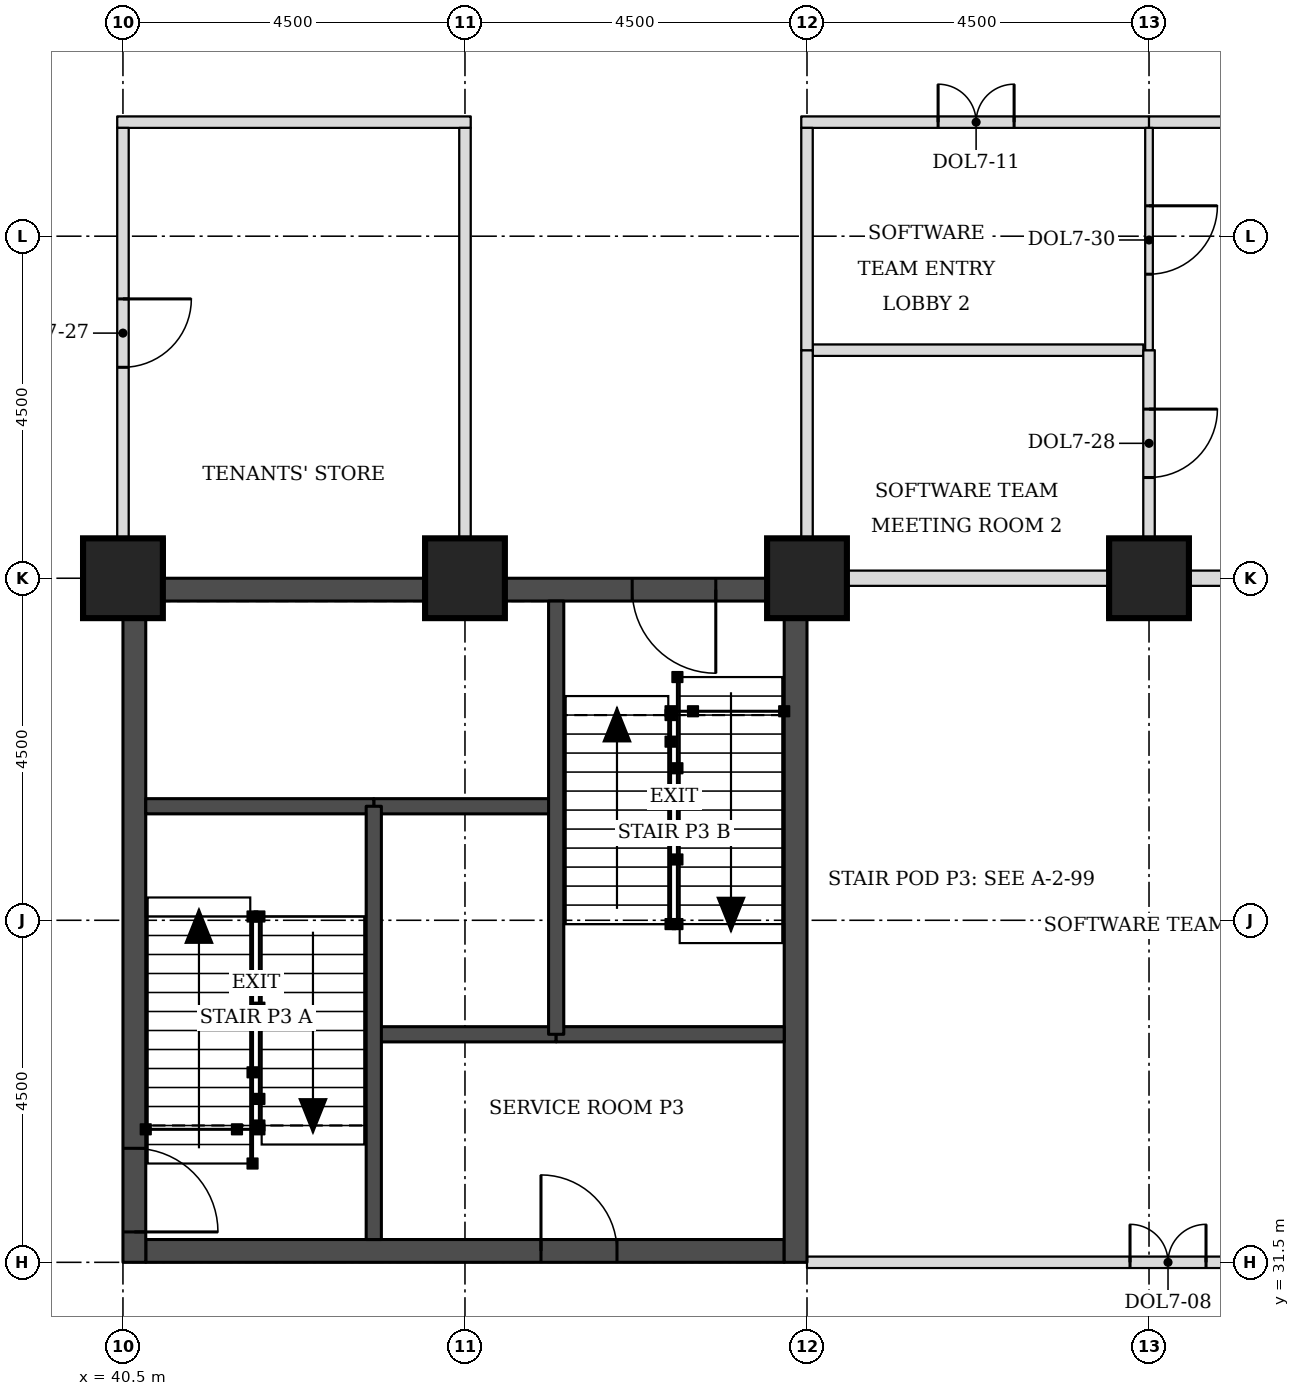
"""IFC4 building model, lengths in metres.
Left out: names, types, materials, properties, quantities, classifications, styles, units other than length and angle.
Written with IfcOpenShell. Run it as: python <this file> out.ifc"""

import sys

from ifc_helpers import new_model, si_unit, direction, frame, frame_2d, origin, origin_2d, place, context, subcontext, project, spatial, rectangle, extrude, element, fill, save


model = new_model("IFC4")
c1 = context("Model", 3, precision=1e-05, world=origin(), true_north=direction((0.0, 1.0)))
c2 = subcontext(c1, "Body", "Model", "MODEL_VIEW")
j1 = project(units=[si_unit("LENGTHUNIT", "METRE"), si_unit("PLANEANGLEUNIT", "RADIAN")], contexts=[c1])
p1 = place(None, origin())
s1 = spatial("IfcSite", under=j1, at=p1, CompositionType="ELEMENT")
p2 = place(p1, origin())
s2 = spatial("IfcBuilding", under=s1, at=p2, CompositionType="ELEMENT")
p3 = place(p2, frame((0.0, 0.0, 130.7)))
s3 = spatial("IfcBuildingStorey", under=s2, at=p3, CompositionType="ELEMENT", Elevation=130.7)
for number, where, z_axis, x_axis in (
    (1, (40.5, 40.5, 0.0), (0.0, 0.0, 1.0), (1.0, 0.0, 0.0)),
    (2, (45.0, 40.5, 0.0), (0.0, 0.0, 1.0), (1.0, 0.0, 0.0)),
    (3, (49.5, 40.5, 0.0), (0.0, 0.0, 1.0), (1.0, 0.0, 0.0)),
    (4, (54.0, 40.5, 0.0), (0.0, 0.0, 1.0), (1.0, 0.0, 0.0)),
):
    element("IfcColumn", number, at=place(p3, frame(where, z_axis=z_axis, x_axis=x_axis)), inside=s3, PredefinedType="COLUMN", context=c2, shape_type="SweptSolid", body=[
        extrude(rectangle(XDim=1.05, YDim=1.05, at=origin_2d()), origin(), (0.0, 0.0, 1.0), 3.7),
    ])
p4 = place(p3, frame((40.8, 31.65, 0.0), z_axis=(0.0, 0.0, 1.0), x_axis=(1.0, 0.0, 0.0)))
e5 = element("IfcWall", 5, at=p4, inside=s3, PredefinedType="SHEAR", context=c2, shape_type="SweptSolid", body=[
    extrude(rectangle(XDim=8.4, YDim=0.3, at=frame_2d((4.2, 0.0))), origin(), (0.0, 0.0, 1.0), 3.7),
])
p5 = place(p4, frame((5.2, 0.0, 0.0)))
e6 = element("IfcOpeningElement", 6, at=p5, cuts=e5, PredefinedType="OPENING", context=c2, shape_type="SweptSolid", body=[
    extrude(rectangle(XDim=1.0, YDim=2.1, at=frame_2d((0.5, 1.05))), frame((0.0, 0.16, 0.0), z_axis=(0.0, -1.0, 0.0), x_axis=(1.0, 0.0, 0.0)), (0.0, 0.0, 1.0), 0.32),
])
p6 = place(p3, frame((40.8, 40.35, 0.0), z_axis=(0.0, 0.0, 1.0), x_axis=(1.0, 0.0, 0.0)))
e7 = element("IfcWall", 7, at=p6, inside=s3, PredefinedType="SHEAR", context=c2, shape_type="SweptSolid", body=[
    extrude(rectangle(XDim=8.4, YDim=0.3, at=frame_2d((4.2, 0.0))), origin(), (0.0, 0.0, 1.0), 3.7),
])
p7 = place(p6, frame((6.4, 0.0, 0.0)))
e8 = element("IfcOpeningElement", 8, at=p7, cuts=e7, PredefinedType="OPENING", context=c2, shape_type="SweptSolid", body=[
    extrude(rectangle(XDim=1.1, YDim=2.1, at=frame_2d((0.55, 1.05))), frame((0.0, 0.16, 0.0), z_axis=(0.0, -1.0, 0.0), x_axis=(1.0, 0.0, 0.0)), (0.0, 0.0, 1.0), 0.32),
])
p8 = place(p3, frame((40.65, 31.5, 0.0), z_axis=(0.0, 0.0, 1.0), x_axis=(0.0, 1.0, 0.0)))
e9 = element("IfcWall", 9, at=p8, inside=s3, PredefinedType="SHEAR", context=c2, shape_type="SweptSolid", body=[
    extrude(rectangle(XDim=9.0, YDim=0.3, at=frame_2d((4.5, 0.0))), origin(), (0.0, 0.0, 1.0), 3.7),
])
p9 = place(p8, frame((0.4, 0.0, 0.0)))
e10 = element("IfcOpeningElement", 10, at=p9, cuts=e9, PredefinedType="OPENING", context=c2, shape_type="SweptSolid", body=[
    extrude(rectangle(XDim=1.1, YDim=2.1, at=frame_2d((0.55, 1.05))), frame((0.0, 0.16, 0.0), z_axis=(0.0, -1.0, 0.0), x_axis=(1.0, 0.0, 0.0)), (0.0, 0.0, 1.0), 0.32),
])
p10 = place(p3, frame((49.35, 31.5, 0.0), z_axis=(0.0, 0.0, 1.0), x_axis=(0.0, 1.0, 0.0)))
e11 = element("IfcWall", 11, at=p10, inside=s3, PredefinedType="SHEAR", context=c2, shape_type="SweptSolid", body=[
    extrude(rectangle(XDim=9.0, YDim=0.3, at=frame_2d((4.5, 0.0))), origin(), (0.0, 0.0, 1.0), 3.7),
])
p11 = place(p3, frame((49.5, 31.5, 0.0), z_axis=(0.0, 0.0, 1.0), x_axis=(1.0, 0.0, 0.0)))
e12 = element("IfcWall", 12, at=p11, inside=s3, PredefinedType="PARTITIONING", context=c2, shape_type="SweptSolid", body=[
    extrude(rectangle(XDim=9.525, YDim=0.15, at=frame_2d((4.762, 0.0))), origin(), (0.0, 0.0, 1.0), 2.55),
])
p12 = place(p11, frame((4.25, 0.0, 0.0)))
e13 = element("IfcOpeningElement", 13, at=p12, cuts=e12, PredefinedType="OPENING", context=c2, shape_type="SweptSolid", body=[
    extrude(rectangle(XDim=1.0, YDim=2.1, at=frame_2d((0.5, 1.05))), frame((0.0, 0.085, 0.0), z_axis=(0.0, -1.0, 0.0), x_axis=(1.0, 0.0, 0.0)), (0.0, 0.0, 1.0), 0.17),
])
p13 = place(p3, frame((50.015, 40.5, 0.0), z_axis=(0.0, 0.0, 1.0), x_axis=(1.0, 0.0, 0.0)))
e14 = element("IfcWall", 14, at=p13, inside=s3, PredefinedType="PARTITIONING", context=c2, shape_type="SweptSolid", body=[
    extrude(rectangle(XDim=3.46, YDim=0.2, at=frame_2d((1.73, 0.0))), origin(), (0.0, 0.0, 1.0), 2.8),
])
p14 = place(p3, frame((54.495, 40.5, 0.0), z_axis=(0.0, 0.0, 1.0), x_axis=(1.0, 0.0, 0.0)))
e15 = element("IfcWall", 15, at=p14, inside=s3, PredefinedType="PARTITIONING", context=c2, shape_type="SweptSolid", body=[
    extrude(rectangle(XDim=3.48, YDim=0.2, at=frame_2d((1.74, 0.0))), origin(), (0.0, 0.0, 1.0), 2.8),
])
p15 = place(p3, frame((49.575, 43.5, 0.0), z_axis=(0.0, 0.0, 1.0), x_axis=(1.0, 0.0, 0.0)))
e16 = element("IfcWall", 16, at=p15, inside=s3, PredefinedType="PARTITIONING", context=c2, shape_type="SweptSolid", body=[
    extrude(rectangle(XDim=4.35, YDim=0.15, at=frame_2d((2.175, 0.0))), origin(), (0.0, 0.0, 1.0), 3.55),
])
p16 = place(p3, frame((40.425, 46.5, 0.0), z_axis=(0.0, 0.0, 1.0), x_axis=(1.0, 0.0, 0.0)))
e17 = element("IfcWall", 17, at=p16, inside=s3, PredefinedType="PARTITIONING", context=c2, shape_type="SweptSolid", body=[
    extrude(rectangle(XDim=4.65, YDim=0.15, at=frame_2d((2.325, 0.0))), origin(), (0.0, 0.0, 1.0), 3.55),
])
p17 = place(p3, frame((49.425, 46.5, 0.0), z_axis=(0.0, 0.0, 1.0), x_axis=(1.0, 0.0, 0.0)))
e18 = element("IfcWall", 18, at=p17, inside=s3, PredefinedType="PARTITIONING", context=c2, shape_type="SweptSolid", body=[
    extrude(rectangle(XDim=4.575, YDim=0.15, at=frame_2d((2.288, 0.0))), origin(), (0.0, 0.0, 1.0), 3.55),
])
p18 = place(p17, frame((1.8, 0.0, 0.0)))
e19 = element("IfcOpeningElement", 19, at=p18, cuts=e18, PredefinedType="OPENING", context=c2, shape_type="SweptSolid", body=[
    extrude(rectangle(XDim=1.0, YDim=2.1, at=frame_2d((0.5, 1.05))), frame((0.0, 0.085, 0.0), z_axis=(0.0, -1.0, 0.0), x_axis=(1.0, 0.0, 0.0)), (0.0, 0.0, 1.0), 0.17),
])
p19 = place(p3, frame((54.0, 46.5, 0.0), z_axis=(0.0, 0.0, 1.0), x_axis=(1.0, 0.0, 0.0)))
e20 = element("IfcWall", 20, at=p19, inside=s3, PredefinedType="PARTITIONING", context=c2, shape_type="SweptSolid", body=[
    extrude(rectangle(XDim=6.0, YDim=0.15, at=frame_2d((3.0, 0.0))), origin(), (0.0, 0.0, 1.0), 3.55),
])
p20 = place(p3, frame((40.5, 41.025, 0.0), z_axis=(0.0, 0.0, 1.0), x_axis=(0.0, 1.0, 0.0)))
e21 = element("IfcWall", 21, at=p20, inside=s3, PredefinedType="PARTITIONING", context=c2, shape_type="SweptSolid", body=[
    extrude(rectangle(XDim=5.4, YDim=0.15, at=frame_2d((2.7, 0.0))), origin(), (0.0, 0.0, 1.0), 3.55),
])
p21 = place(p20, frame((2.25, 0.0, 0.0)))
e22 = element("IfcOpeningElement", 22, at=p21, cuts=e21, PredefinedType="OPENING", context=c2, shape_type="SweptSolid", body=[
    extrude(rectangle(XDim=0.9, YDim=2.1, at=frame_2d((0.45, 1.05))), frame((0.0, 0.085, 0.0), z_axis=(0.0, -1.0, 0.0), x_axis=(1.0, 0.0, 0.0)), (0.0, 0.0, 1.0), 0.17),
])
p22 = place(p3, frame((45.0, 41.025, 0.0), z_axis=(0.0, 0.0, 1.0), x_axis=(0.0, 1.0, 0.0)))
e23 = element("IfcWall", 23, at=p22, inside=s3, PredefinedType="PARTITIONING", context=c2, shape_type="SweptSolid", body=[
    extrude(rectangle(XDim=5.4, YDim=0.15, at=frame_2d((2.7, 0.0))), origin(), (0.0, 0.0, 1.0), 3.55),
])
p23 = place(p3, frame((49.5, 41.025, 0.0), z_axis=(0.0, 0.0, 1.0), x_axis=(0.0, 1.0, 0.0)))
e24 = element("IfcWall", 24, at=p23, inside=s3, PredefinedType="PARTITIONING", context=c2, shape_type="SweptSolid", body=[
    extrude(rectangle(XDim=2.475, YDim=0.15, at=frame_2d((1.238, 0.0))), origin(), (0.0, 0.0, 1.0), 3.55),
])
p24 = place(p3, frame((54.0, 41.025, 0.0), z_axis=(0.0, 0.0, 1.0), x_axis=(0.0, 1.0, 0.0)))
e25 = element("IfcWall", 25, at=p24, inside=s3, PredefinedType="PARTITIONING", context=c2, shape_type="SweptSolid", body=[
    extrude(rectangle(XDim=2.475, YDim=0.15, at=frame_2d((1.238, 0.0))), origin(), (0.0, 0.0, 1.0), 3.55),
])
p25 = place(p24, frame((0.8, 0.0, 0.0)))
e26 = element("IfcOpeningElement", 26, at=p25, cuts=e25, PredefinedType="OPENING", context=c2, shape_type="SweptSolid", body=[
    extrude(rectangle(XDim=0.9, YDim=2.1, at=frame_2d((0.45, 1.05))), frame((0.0, 0.085, 0.0), z_axis=(0.0, -1.0, 0.0), x_axis=(1.0, 0.0, 0.0)), (0.0, 0.0, 1.0), 0.17),
])
p26 = place(p3, frame((49.5, 43.5, 0.0), z_axis=(0.0, 0.0, 1.0), x_axis=(0.0, 1.0, 0.0)))
e27 = element("IfcWall", 27, at=p26, inside=s3, PredefinedType="PARTITIONING", context=c2, shape_type="SweptSolid", body=[
    extrude(rectangle(XDim=2.925, YDim=0.15, at=frame_2d((1.462, 0.0))), origin(), (0.0, 0.0, 1.0), 3.55),
])
p27 = place(p3, frame((54.0, 43.5, 0.0), z_axis=(0.0, 0.0, 1.0), x_axis=(0.0, 1.0, 0.0)))
e28 = element("IfcWall", 28, at=p27, inside=s3, PredefinedType="PARTITIONING", context=c2, shape_type="SweptSolid", body=[
    extrude(rectangle(XDim=2.925, YDim=0.1, at=frame_2d((1.462, 0.0))), origin(), (0.0, 0.0, 1.0), 3.55),
])
p28 = place(p27, frame((1.0, 0.0, 0.0)))
e29 = element("IfcOpeningElement", 29, at=p28, cuts=e28, PredefinedType="OPENING", context=c2, shape_type="SweptSolid", body=[
    extrude(rectangle(XDim=0.9, YDim=2.1, at=frame_2d((0.45, 1.05))), frame((0.0, 0.06, 0.0), z_axis=(0.0, -1.0, 0.0), x_axis=(1.0, 0.0, 0.0)), (0.0, 0.0, 1.0), 0.12),
])
p29 = place(p3, frame((43.8, 34.5, 0.0), z_axis=(0.0, 0.0, 1.0), x_axis=(1.0, 0.0, 0.0)))
e30 = element("IfcWall", 30, at=p29, inside=s3, PredefinedType="SOLIDWALL", context=c2, shape_type="SweptSolid", body=[
    extrude(rectangle(XDim=2.4, YDim=0.2, at=frame_2d((1.2, 0.0))), origin(), (0.0, 0.0, 1.0), 3.55),
])
p30 = place(p3, frame((46.2, 34.5, 0.0), z_axis=(0.0, 0.0, 1.0), x_axis=(1.0, 0.0, 0.0)))
e31 = element("IfcWall", 31, at=p30, inside=s3, PredefinedType="SOLIDWALL", context=c2, shape_type="SweptSolid", body=[
    extrude(rectangle(XDim=3.0, YDim=0.2, at=frame_2d((1.5, 0.0))), origin(), (0.0, 0.0, 1.0), 3.55),
])
p31 = place(p3, frame((43.8, 37.5, 0.0), z_axis=(0.0, 0.0, 1.0), x_axis=(1.0, 0.0, 0.0)))
e32 = element("IfcWall", 32, at=p31, inside=s3, PredefinedType="SOLIDWALL", context=c2, shape_type="SweptSolid", body=[
    extrude(rectangle(XDim=2.4, YDim=0.2, at=frame_2d((1.2, 0.0))), origin(), (0.0, 0.0, 1.0), 3.7),
])
p32 = place(p3, frame((40.8, 37.5, 0.0), z_axis=(0.0, 0.0, 1.0), x_axis=(1.0, 0.0, 0.0)))
e33 = element("IfcWall", 33, at=p32, inside=s3, PredefinedType="SOLIDWALL", context=c2, shape_type="SweptSolid", body=[
    extrude(rectangle(XDim=3.0, YDim=0.2, at=frame_2d((1.5, 0.0))), origin(), (0.0, 0.0, 1.0), 3.55),
])
for number, where, z_axis, x_axis in (
    (34, (43.8, 31.8, 0.0), (0.0, 0.0, 1.0), (0.0, 1.0, 0.0)),
    (35, (46.2, 34.5, 0.0), (0.0, 0.0, 1.0), (0.0, 1.0, 0.0)),
):
    element("IfcWall", number, at=place(p3, frame(where, z_axis=z_axis, x_axis=x_axis)), inside=s3, PredefinedType="SOLIDWALL", context=c2, shape_type="SweptSolid", body=[
        extrude(rectangle(XDim=5.7, YDim=0.2, at=frame_2d((2.85, 0.0))), origin(), (0.0, 0.0, 1.0), 3.55),
    ])
p33 = place(p21, frame((0.9, 0.0, 0.0), z_axis=(0.0, 0.0, 1.0), x_axis=(-1.0, 0.0, 0.0)))
e36 = element("IfcDoor", 36, at=p33, inside=s3, OperationType="SINGLE_SWING_LEFT", PredefinedType="DOOR", context=c2, shape_type="SweptSolid", body=[
    extrude(rectangle(XDim=0.9, YDim=2.1, at=frame_2d((0.45, 1.05))), frame((0.0, 0.025, 0.0), z_axis=(0.0, -1.0, 0.0), x_axis=(1.0, 0.0, 0.0)), (0.0, 0.0, 1.0), 0.05),
])
fill(e22, e36)
p34 = place(p12, origin())
e37 = element("IfcDoor", 37, at=p34, inside=s3, OperationType="DOUBLE_DOOR_SINGLE_SWING", PredefinedType="DOOR", context=c2, shape_type="SweptSolid", body=[
    extrude(rectangle(XDim=1.0, YDim=2.1, at=frame_2d((0.5, 1.05))), frame((0.0, 0.025, 0.0), z_axis=(0.0, -1.0, 0.0), x_axis=(1.0, 0.0, 0.0)), (0.0, 0.0, 1.0), 0.05),
])
fill(e13, e37)
p35 = place(p18, origin())
e38 = element("IfcDoor", 38, at=p35, inside=s3, OperationType="DOUBLE_DOOR_SINGLE_SWING", PredefinedType="DOOR", context=c2, shape_type="SweptSolid", body=[
    extrude(rectangle(XDim=1.0, YDim=2.1, at=frame_2d((0.5, 1.05))), frame((0.0, 0.025, 0.0), z_axis=(0.0, -1.0, 0.0), x_axis=(1.0, 0.0, 0.0)), (0.0, 0.0, 1.0), 0.05),
])
fill(e19, e38)
p36 = place(p28, frame((0.9, 0.0, 0.0), z_axis=(0.0, 0.0, 1.0), x_axis=(-1.0, 0.0, 0.0)))
e39 = element("IfcDoor", 39, at=p36, inside=s3, OperationType="SINGLE_SWING_LEFT", PredefinedType="DOOR", context=c2, shape_type="SweptSolid", body=[
    extrude(rectangle(XDim=0.9, YDim=2.1, at=frame_2d((0.45, 1.05))), frame((0.0, 0.025, 0.0), z_axis=(0.0, -1.0, 0.0), x_axis=(1.0, 0.0, 0.0)), (0.0, 0.0, 1.0), 0.05),
])
fill(e29, e39)
p37 = place(p25, frame((0.9, 0.0, 0.0), z_axis=(0.0, 0.0, 1.0), x_axis=(-1.0, 0.0, 0.0)))
e40 = element("IfcDoor", 40, at=p37, inside=s3, OperationType="SINGLE_SWING_LEFT", PredefinedType="DOOR", context=c2, shape_type="SweptSolid", body=[
    extrude(rectangle(XDim=0.9, YDim=2.1, at=frame_2d((0.45, 1.05))), frame((0.0, 0.025, 0.0), z_axis=(0.0, -1.0, 0.0), x_axis=(1.0, 0.0, 0.0)), (0.0, 0.0, 1.0), 0.05),
])
fill(e26, e40)
p38 = place(p9, frame((1.1, 0.0, 0.0), z_axis=(0.0, 0.0, 1.0), x_axis=(-1.0, 0.0, 0.0)))
e41 = element("IfcDoor", 41, at=p38, inside=s3, OperationType="SINGLE_SWING_RIGHT", PredefinedType="DOOR", context=c2, shape_type="SweptSolid", body=[
    extrude(rectangle(XDim=1.1, YDim=2.1, at=frame_2d((0.55, 1.05))), frame((0.0, 0.025, 0.0), z_axis=(0.0, -1.0, 0.0), x_axis=(1.0, 0.0, 0.0)), (0.0, 0.0, 1.0), 0.05),
])
fill(e10, e41)
p39 = place(p7, frame((1.1, 0.0, 0.0), z_axis=(0.0, 0.0, 1.0), x_axis=(-1.0, 0.0, 0.0)))
e42 = element("IfcDoor", 42, at=p39, inside=s3, OperationType="SINGLE_SWING_LEFT", PredefinedType="DOOR", context=c2, shape_type="SweptSolid", body=[
    extrude(rectangle(XDim=1.1, YDim=2.1, at=frame_2d((0.55, 1.05))), frame((0.0, 0.025, 0.0), z_axis=(0.0, -1.0, 0.0), x_axis=(1.0, 0.0, 0.0)), (0.0, 0.0, 1.0), 0.05),
])
fill(e8, e42)
p40 = place(p5, origin())
e43 = element("IfcDoor", 43, at=p40, inside=s3, OperationType="SINGLE_SWING_LEFT", PredefinedType="DOOR", context=c2, shape_type="SweptSolid", body=[
    extrude(rectangle(XDim=1.0, YDim=2.1, at=frame_2d((0.5, 1.05))), frame((0.0, 0.025, 0.0), z_axis=(0.0, -1.0, 0.0), x_axis=(1.0, 0.0, 0.0)), (0.0, 0.0, 1.0), 0.05),
])
fill(e6, e43)
save(model, sys.argv[1])
